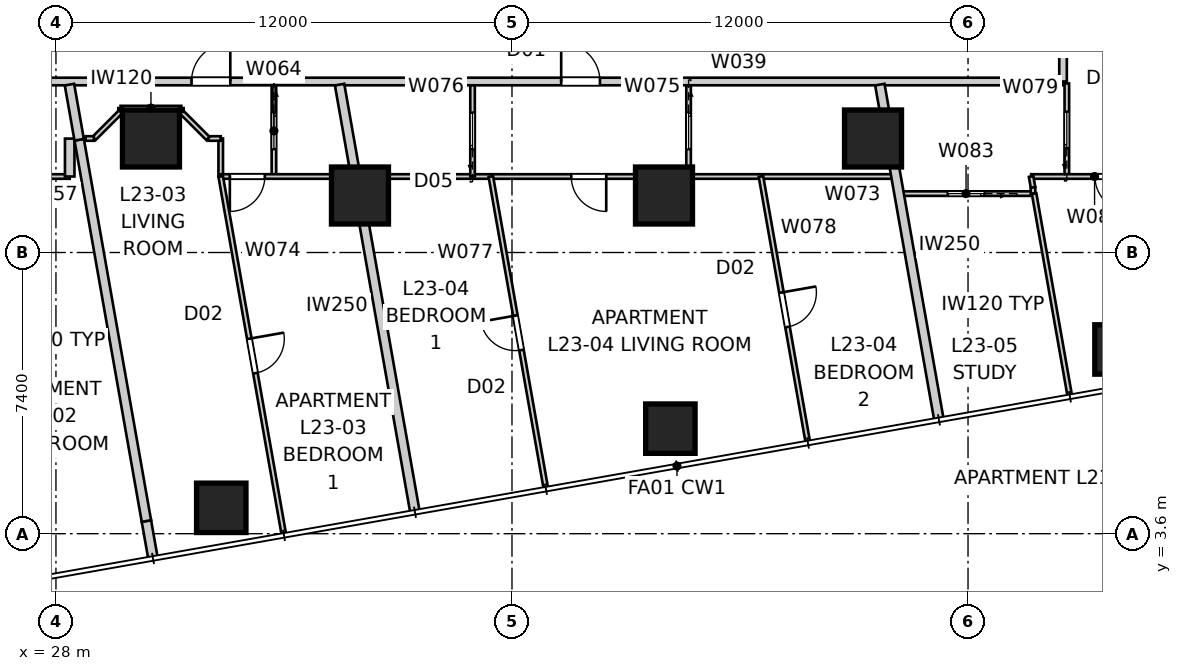
"""IFC4 building model, lengths in metres.
Left out: names, types, materials, properties, quantities, classifications, styles, units other than length and angle.
Written with IfcOpenShell. Run it as: python <this file> out.ifc"""

import sys

from ifc_helpers import new_model, si_unit, direction, frame, frame_2d, origin, origin_2d, place, context, subcontext, project, spatial, rectangle, extrude, element, fill, save


model = new_model("IFC4")
c1 = context("Model", 3, precision=1e-05, world=origin(), true_north=direction((0.0, 1.0)))
c2 = subcontext(c1, "Body", "Model", "MODEL_VIEW")
j1 = project(units=[si_unit("LENGTHUNIT", "METRE"), si_unit("PLANEANGLEUNIT", "RADIAN")], contexts=[c1])
p1 = place(None, origin())
s1 = spatial("IfcSite", under=j1, at=p1, CompositionType="ELEMENT")
p2 = place(p1, origin())
s2 = spatial("IfcBuilding", under=s1, at=p2, CompositionType="ELEMENT")
p3 = place(p2, frame((0.0, 0.0, 86.2)))
s3 = spatial("IfcBuildingStorey", under=s2, at=p3, CompositionType="ELEMENT", Elevation=86.2)
for number, where, z_axis, x_axis in (
    (1, (32.35, 4.281, 0.0), (0.0, 0.0, 1.0), (1.0, 0.0, 0.0)),
    (2, (44.167, 6.365, 0.0), (0.0, 0.0, 1.0), (1.0, 0.0, 0.0)),
    (3, (55.985, 8.448, 0.0), (0.0, 0.0, 1.0), (1.0, 0.0, 0.0)),
):
    element("IfcColumn", number, at=place(p3, frame(where, z_axis=z_axis, x_axis=x_axis)), inside=s3, PredefinedType="COLUMN", context=c2, shape_type="SweptSolid", body=[
        extrude(rectangle(XDim=1.3, YDim=1.3, at=origin_2d()), origin(), (0.0, 0.0, 1.0), 3.4),
    ])
for number, where, z_axis, x_axis in (
    (4, (30.5, 14.0, 0.0), (0.0, 0.0, 1.0), (1.0, 0.0, 0.0)),
    (5, (36.0, 12.5, 0.0), (0.0, 0.0, 1.0), (1.0, 0.0, 0.0)),
    (6, (44.0, 12.5, 0.0), (0.0, 0.0, 1.0), (1.0, 0.0, 0.0)),
    (7, (49.5, 14.0, 0.0), (0.0, 0.0, 1.0), (1.0, 0.0, 0.0)),
):
    element("IfcColumn", number, at=place(p3, frame(where, z_axis=z_axis, x_axis=x_axis)), inside=s3, PredefinedType="COLUMN", context=c2, shape_type="SweptSolid", body=[
        extrude(rectangle(XDim=1.5, YDim=1.5, at=origin_2d()), origin(), (0.0, 0.0, 1.0), 3.4),
    ])
p4 = place(p3, frame((25.5, 15.5, 0.0), z_axis=(0.0, 0.0, 1.0), x_axis=(1.0, 0.0, 0.0)))
e8 = element("IfcWall", 8, at=p4, inside=s3, PredefinedType="PARTITIONING", context=c2, shape_type="SweptSolid", body=[
    extrude(rectangle(XDim=29.0, YDim=0.2, at=frame_2d((14.5, 0.0))), origin(), (0.0, 0.0, 1.0), 3.25),
])
p5 = place(p4, frame((15.794, 0.0, 0.0)))
e9 = element("IfcOpeningElement", 9, at=p5, cuts=e8, PredefinedType="OPENING", context=c2, shape_type="SweptSolid", body=[
    extrude(rectangle(XDim=1.02, YDim=2.34, at=frame_2d((0.51, 1.17))), frame((0.0, 0.11, 0.0), z_axis=(0.0, -1.0, 0.0), x_axis=(1.0, 0.0, 0.0)), (0.0, 0.0, 1.0), 0.22),
])
p6 = place(p4, frame((6.067, 0.0, 0.0)))
e10 = element("IfcOpeningElement", 10, at=p6, cuts=e8, PredefinedType="OPENING", context=c2, shape_type="SweptSolid", body=[
    extrude(rectangle(XDim=1.02, YDim=2.34, at=frame_2d((0.51, 1.17))), frame((0.0, 0.11, 0.0), z_axis=(0.0, -1.0, 0.0), x_axis=(1.0, 0.0, 0.0)), (0.0, 0.0, 1.0), 0.22),
])
p7 = place(p4, frame((1.079, 0.0, 0.0)))
e11 = element("IfcOpeningElement", 11, at=p7, cuts=e8, PredefinedType="OPENING", context=c2, shape_type="SweptSolid", body=[
    extrude(rectangle(XDim=1.02, YDim=2.34, at=frame_2d((0.51, 1.17))), frame((0.0, 0.11, 0.0), z_axis=(0.0, -1.0, 0.0), x_axis=(1.0, 0.0, 0.0)), (0.0, 0.0, 1.0), 0.22),
])
p8 = place(p3, frame((54.5, 15.5, 0.0), z_axis=(0.0, 0.0, 1.0), x_axis=(0.0, 1.0, 0.0)))
e12 = element("IfcWall", 12, at=p8, inside=s3, PredefinedType="PARTITIONING", context=c2, shape_type="SweptSolid", body=[
    extrude(rectangle(XDim=29.0, YDim=0.2, at=frame_2d((14.5, 0.0))), origin(), (0.0, 0.0, 1.0), 3.25),
])
p9 = place(p8, frame((21.815, 0.0, 0.0)))
e13 = element("IfcOpeningElement", 13, at=p9, cuts=e12, PredefinedType="OPENING", context=c2, shape_type="SweptSolid", body=[
    extrude(rectangle(XDim=1.02, YDim=2.34, at=frame_2d((0.51, 1.17))), frame((0.0, 0.11, 0.0), z_axis=(0.0, -1.0, 0.0), x_axis=(1.0, 0.0, 0.0)), (0.0, 0.0, 1.0), 0.22),
])
p10 = place(p8, frame((2.855, 0.0, 0.0)))
e14 = element("IfcOpeningElement", 14, at=p10, cuts=e12, PredefinedType="OPENING", context=c2, shape_type="SweptSolid", body=[
    extrude(rectangle(XDim=1.02, YDim=2.1, at=frame_2d((0.51, 1.05))), frame((0.0, 0.11, 0.0), z_axis=(0.0, -1.0, 0.0), x_axis=(1.0, 0.0, 0.0)), (0.0, 0.0, 1.0), 0.22),
])
p11 = place(p3, frame((37.448, 4.164, 0.0), z_axis=(0.0, 0.0, 1.0), x_axis=(-0.173635416642, 0.98481000304, 0.0)))
e15 = element("IfcWall", 15, at=p11, inside=s3, PredefinedType="PARTITIONING", context=c2, shape_type="SweptSolid", body=[
    extrude(rectangle(XDim=11.427, YDim=0.25, at=frame_2d((5.713, 0.0))), origin(), (0.0, 0.0, 1.0), 3.25),
])
p12 = place(p3, frame((51.235, 6.595, 0.0), z_axis=(0.0, 0.0, 1.0), x_axis=(-0.173654738504, 0.984806596137, 0.0)))
e16 = element("IfcWall", 16, at=p12, inside=s3, PredefinedType="PARTITIONING", context=c2, shape_type="SweptSolid", body=[
    extrude(rectangle(XDim=8.958, YDim=0.25, at=frame_2d((4.479, 0.0))), origin(), (0.0, 0.0, 1.0), 3.25),
])
p13 = place(p3, frame((30.554, 2.949, 0.0), z_axis=(0.0, 0.0, 1.0), x_axis=(-0.173813186416, 0.984778643263, 0.0)))
e17 = element("IfcWall", 17, at=p13, inside=s3, PredefinedType="PARTITIONING", context=c2, shape_type="SweptSolid", body=[
    extrude(rectangle(XDim=1.0, YDim=0.25, at=frame_2d((0.5, 0.0))), origin(), (0.0, 0.0, 1.0), 3.25),
])
p14 = place(p3, frame((30.38, 3.934, 0.0), z_axis=(0.0, 0.0, 1.0), x_axis=(-0.173644522411, 0.984808397525, 0.0)))
e18 = element("IfcWall", 18, at=p14, inside=s3, PredefinedType="PARTITIONING", context=c2, shape_type="SweptSolid", body=[
    extrude(rectangle(XDim=10.188, YDim=0.25, at=frame_2d((5.094, 0.0))), origin(), (0.0, 0.0, 1.0), 2.638),
])
p15 = place(p3, frame((28.611, 13.967, 0.0), z_axis=(0.0, 0.0, 1.0), x_axis=(-0.173634105885, 0.984810234143, 0.0)))
e19 = element("IfcWall", 19, at=p15, inside=s3, PredefinedType="PARTITIONING", context=c2, shape_type="SweptSolid", body=[
    extrude(rectangle(XDim=1.474, YDim=0.25, at=frame_2d((0.737, 0.0))), origin(), (0.0, 0.0, 1.0), 3.25),
])
p16 = place(p3, frame((28.362, 13.0, 0.0), z_axis=(0.0, 0.0, 1.0), x_axis=(-1.0, 0.0, 0.0)))
e20 = element("IfcWall", 20, at=p16, inside=s3, PredefinedType="PARTITIONING", context=c2, shape_type="SweptSolid", body=[
    extrude(rectangle(XDim=4.151, YDim=0.12, at=frame_2d((2.076, 0.0))), origin(), (0.0, 0.0, 1.0), 2.638),
])
p17 = place(p16, frame((1.76, 0.0, 0.0)))
e21 = element("IfcOpeningElement", 21, at=p17, cuts=e20, PredefinedType="OPENING", context=c2, shape_type="SweptSolid", body=[
    extrude(rectangle(XDim=0.92, YDim=2.34, at=frame_2d((0.46, 1.17))), frame((0.0, 0.07, 0.0), z_axis=(0.0, -1.0, 0.0), x_axis=(1.0, 0.0, 0.0)), (0.0, 0.0, 1.0), 0.14),
])
p18 = place(p3, frame((28.362, 13.998, 0.0), z_axis=(0.0, 0.0, 1.0), x_axis=(0.0, -1.0, 0.0)))
e22 = element("IfcWall", 22, at=p18, inside=s3, PredefinedType="PARTITIONING", context=c2, shape_type="SweptSolid", body=[
    extrude(rectangle(XDim=0.998, YDim=0.25, at=frame_2d((0.499, 0.0))), origin(), (0.0, 0.0, 1.0), 3.25),
])
p19 = place(p3, frame((33.736, 15.4, 0.0), z_axis=(0.0, 0.0, 1.0), x_axis=(0.0, -1.0, 0.0)))
e23 = element("IfcWall", 23, at=p19, inside=s3, PredefinedType="PARTITIONING", context=c2, shape_type="SweptSolid", body=[
    extrude(rectangle(XDim=2.4, YDim=0.12, at=frame_2d((1.2, 0.0))), origin(), (0.0, 0.0, 1.0), 3.25),
])
p20 = place(p19, frame((0.72, 0.0, 0.0)))
e24 = element("IfcOpeningElement", 24, at=p20, cuts=e23, PredefinedType="OPENING", context=c2, shape_type="SweptSolid", body=[
    extrude(rectangle(XDim=0.96, YDim=2.1, at=frame_2d((0.48, 1.05))), frame((0.0, 0.07, 0.0), z_axis=(0.0, -1.0, 0.0), x_axis=(1.0, 0.0, 0.0)), (0.0, 0.0, 1.0), 0.14),
])
p21 = place(p3, frame((32.336, 13.0, 0.0), z_axis=(0.0, 0.0, 1.0), x_axis=(0.0, 1.0, 0.0)))
e25 = element("IfcWall", 25, at=p21, inside=s3, PredefinedType="PARTITIONING", context=c2, shape_type="SweptSolid", body=[
    extrude(rectangle(XDim=1.0, YDim=0.12, at=frame_2d((0.5, 0.0))), origin(), (0.0, 0.0, 1.0), 3.25),
])
p22 = place(p3, frame((32.336, 14.0, 0.0), z_axis=(0.0, 0.0, 1.0), x_axis=(-1.0, 0.0, 0.0)))
e26 = element("IfcWall", 26, at=p22, inside=s3, PredefinedType="PARTITIONING", context=c2, shape_type="SweptSolid", body=[
    extrude(rectangle(XDim=0.336, YDim=0.12, at=frame_2d((0.168, 0.0))), origin(), (0.0, 0.0, 1.0), 3.25),
])
p23 = place(p3, frame((32.0, 14.0, 0.0), z_axis=(0.0, 0.0, 1.0), x_axis=(-0.707106781187, 0.707106781187, 0.0)))
e27 = element("IfcWall", 27, at=p23, inside=s3, PredefinedType="PARTITIONING", context=c2, shape_type="SweptSolid", body=[
    extrude(rectangle(XDim=0.99, YDim=0.12, at=frame_2d((0.495, 0.0))), origin(), (0.0, 0.0, 1.0), 3.25),
])
p24 = place(p3, frame((31.3, 14.8, 0.0), z_axis=(0.0, 0.0, 1.0), x_axis=(-1.0, 0.0, 0.0)))
e28 = element("IfcWall", 28, at=p24, inside=s3, PredefinedType="PARTITIONING", context=c2, shape_type="SweptSolid", body=[
    extrude(rectangle(XDim=1.6, YDim=0.12, at=frame_2d((0.8, 0.0))), origin(), (0.0, 0.0, 1.0), 3.25),
])
p25 = place(p3, frame((29.7, 14.7, 0.0), z_axis=(0.0, 0.0, 1.0), x_axis=(-0.707106781187, -0.707106781187, 0.0)))
e29 = element("IfcWall", 29, at=p25, inside=s3, PredefinedType="PARTITIONING", context=c2, shape_type="SweptSolid", body=[
    extrude(rectangle(XDim=0.99, YDim=0.12, at=frame_2d((0.495, 0.0))), origin(), (0.0, 0.0, 1.0), 3.25),
])
p26 = place(p3, frame((29.0, 14.0, 0.0), z_axis=(0.0, 0.0, 1.0), x_axis=(-1.0, 0.0, 0.0)))
e30 = element("IfcWall", 30, at=p26, inside=s3, PredefinedType="PARTITIONING", context=c2, shape_type="SweptSolid", body=[
    extrude(rectangle(XDim=0.219, YDim=0.12, at=frame_2d((0.109, 0.0))), origin(), (0.0, 0.0, 1.0), 3.25),
])
p27 = place(p3, frame((50.105, 13.0, 0.0), z_axis=(0.0, 0.0, 1.0), x_axis=(-1.0, 0.0, 0.0)))
e31 = element("IfcWall", 31, at=p27, inside=s3, PredefinedType="PARTITIONING", context=c2, shape_type="SweptSolid", body=[
    extrude(rectangle(XDim=17.77, YDim=0.12, at=frame_2d((8.885, 0.0))), origin(), (0.0, 0.0, 1.0), 2.55),
])
p28 = place(p27, frame((7.626, 0.0, 0.0)))
e32 = element("IfcOpeningElement", 32, at=p28, cuts=e31, PredefinedType="OPENING", context=c2, shape_type="SweptSolid", body=[
    extrude(rectangle(XDim=0.92, YDim=2.34, at=frame_2d((0.46, 1.17))), frame((0.0, 0.07, 0.0), z_axis=(0.0, -1.0, 0.0), x_axis=(1.0, 0.0, 0.0)), (0.0, 0.0, 1.0), 0.14),
])
p29 = place(p27, frame((16.61, 0.0, 0.0)))
e33 = element("IfcOpeningElement", 33, at=p29, cuts=e31, PredefinedType="OPENING", context=c2, shape_type="SweptSolid", body=[
    extrude(rectangle(XDim=0.92, YDim=2.34, at=frame_2d((0.46, 1.17))), frame((0.0, 0.07, 0.0), z_axis=(0.0, -1.0, 0.0), x_axis=(1.0, 0.0, 0.0)), (0.0, 0.0, 1.0), 0.14),
])
p30 = place(p3, frame((32.336, 13.0, 0.0), z_axis=(0.0, 0.0, 1.0), x_axis=(0.173624894944, -0.984811858101, 0.0)))
e34 = element("IfcWall", 34, at=p30, inside=s3, PredefinedType="PARTITIONING", context=c2, shape_type="SweptSolid", body=[
    extrude(rectangle(XDim=9.549, YDim=0.12, at=frame_2d((4.774, 0.0))), origin(), (0.0, 0.0, 1.0), 3.25),
])
p31 = place(p30, frame((4.334, 0.0, 0.0)))
e35 = element("IfcOpeningElement", 35, at=p31, cuts=e34, PredefinedType="OPENING", context=c2, shape_type="SweptSolid", body=[
    extrude(rectangle(XDim=0.92, YDim=2.34, at=frame_2d((0.46, 1.17))), frame((0.0, 0.07, 0.0), z_axis=(0.0, -1.0, 0.0), x_axis=(1.0, 0.0, 0.0)), (0.0, 0.0, 1.0), 0.14),
])
p32 = place(p3, frame((44.647, 15.4, 0.0), z_axis=(0.0, 0.0, 1.0), x_axis=(0.0, -1.0, 0.0)))
e36 = element("IfcWall", 36, at=p32, inside=s3, PredefinedType="PARTITIONING", context=c2, shape_type="SweptSolid", body=[
    extrude(rectangle(XDim=2.4, YDim=0.12, at=frame_2d((1.2, 0.0))), origin(), (0.0, 0.0, 1.0), 3.25),
])
p33 = place(p32, frame((0.72, 0.0, 0.0)))
e37 = element("IfcOpeningElement", 37, at=p33, cuts=e36, PredefinedType="OPENING", context=c2, shape_type="SweptSolid", body=[
    extrude(rectangle(XDim=0.96, YDim=2.1, at=frame_2d((0.48, 1.05))), frame((0.0, 0.07, 0.0), z_axis=(0.0, -1.0, 0.0), x_axis=(1.0, 0.0, 0.0)), (0.0, 0.0, 1.0), 0.14),
])
p34 = place(p3, frame((38.962, 13.0, 0.0), z_axis=(0.0, 0.0, 1.0), x_axis=(0.0, 1.0, 0.0)))
e38 = element("IfcWall", 38, at=p34, inside=s3, PredefinedType="PARTITIONING", context=c2, shape_type="SweptSolid", body=[
    extrude(rectangle(XDim=2.4, YDim=0.12, at=frame_2d((1.2, 0.0))), origin(), (0.0, 0.0, 1.0), 3.25),
])
p35 = place(p34, frame((0.72, 0.0, 0.0)))
e39 = element("IfcOpeningElement", 39, at=p35, cuts=e38, PredefinedType="OPENING", context=c2, shape_type="SweptSolid", body=[
    extrude(rectangle(XDim=0.96, YDim=2.1, at=frame_2d((0.48, 1.05))), frame((0.0, 0.07, 0.0), z_axis=(0.0, -1.0, 0.0), x_axis=(1.0, 0.0, 0.0)), (0.0, 0.0, 1.0), 0.14),
])
p36 = place(p3, frame((40.887, 4.812, 0.0), z_axis=(0.0, 0.0, 1.0), x_axis=(-0.173647980238, 0.984807787824, 0.0)))
e40 = element("IfcWall", 40, at=p36, inside=s3, PredefinedType="PARTITIONING", context=c2, shape_type="SweptSolid", body=[
    extrude(rectangle(XDim=8.315, YDim=0.12, at=frame_2d((4.157, 0.0))), origin(), (0.0, 0.0, 1.0), 3.25),
])
p37 = place(p36, frame((3.677, 0.0, 0.0)))
e41 = element("IfcOpeningElement", 41, at=p37, cuts=e40, PredefinedType="OPENING", context=c2, shape_type="SweptSolid", body=[
    extrude(rectangle(XDim=0.92, YDim=2.34, at=frame_2d((0.46, 1.17))), frame((0.0, 0.07, 0.0), z_axis=(0.0, -1.0, 0.0), x_axis=(1.0, 0.0, 0.0)), (0.0, 0.0, 1.0), 0.14),
])
p38 = place(p3, frame((46.552, 13.0, 0.0), z_axis=(0.0, 0.0, 1.0), x_axis=(0.173639776761, -0.984809234282, 0.0)))
e42 = element("IfcWall", 42, at=p38, inside=s3, PredefinedType="PARTITIONING", context=c2, shape_type="SweptSolid", body=[
    extrude(rectangle(XDim=7.081, YDim=0.12, at=frame_2d((3.541, 0.0))), origin(), (0.0, 0.0, 1.0), 3.25),
])
p39 = place(p38, frame((3.1, 0.0, 0.0)))
e43 = element("IfcOpeningElement", 43, at=p39, cuts=e42, PredefinedType="OPENING", context=c2, shape_type="SweptSolid", body=[
    extrude(rectangle(XDim=0.92, YDim=2.34, at=frame_2d((0.46, 1.17))), frame((0.0, 0.07, 0.0), z_axis=(0.0, -1.0, 0.0), x_axis=(1.0, 0.0, 0.0)), (0.0, 0.0, 1.0), 0.14),
])
p40 = place(p3, frame((54.6, 13.0, 0.0), z_axis=(0.0, 0.0, 1.0), x_axis=(0.0, 1.0, 0.0)))
e44 = element("IfcWall", 44, at=p40, inside=s3, PredefinedType="PARTITIONING", context=c2, shape_type="SweptSolid", body=[
    extrude(rectangle(XDim=2.45, YDim=0.12, at=frame_2d((1.225, 0.0))), origin(), (0.0, 0.0, 1.0), 3.25),
])
p41 = place(p40, frame((0.745, 0.0, 0.0)))
e45 = element("IfcOpeningElement", 45, at=p41, cuts=e44, PredefinedType="OPENING", context=c2, shape_type="SweptSolid", body=[
    extrude(rectangle(XDim=0.96, YDim=2.1, at=frame_2d((0.48, 1.05))), frame((0.0, 0.07, 0.0), z_axis=(0.0, -1.0, 0.0), x_axis=(1.0, 0.0, 0.0)), (0.0, 0.0, 1.0), 0.14),
])
p42 = place(p3, frame((57.0, 13.0, 0.0), z_axis=(0.0, 0.0, 1.0), x_axis=(-1.0, 0.0, 0.0)))
e46 = element("IfcWall", 46, at=p42, inside=s3, PredefinedType="PARTITIONING", context=c2, shape_type="SweptSolid", body=[
    extrude(rectangle(XDim=3.34, YDim=0.12, at=frame_2d((1.67, 0.0))), origin(), (0.0, 0.0, 1.0), 3.25),
])
p43 = place(p42, frame((0.74, 0.0, 0.0)))
e47 = element("IfcOpeningElement", 47, at=p43, cuts=e46, PredefinedType="OPENING", context=c2, shape_type="SweptSolid", body=[
    extrude(rectangle(XDim=0.92, YDim=2.34, at=frame_2d((0.46, 1.17))), frame((0.0, 0.07, 0.0), z_axis=(0.0, -1.0, 0.0), x_axis=(1.0, 0.0, 0.0)), (0.0, 0.0, 1.0), 0.14),
])
p44 = place(p3, frame((53.71, 12.55, 0.0), z_axis=(0.0, 0.0, 1.0), x_axis=(-1.0, 0.0, 0.0)))
e48 = element("IfcWall", 48, at=p44, inside=s3, PredefinedType="PARTITIONING", context=c2, shape_type="SweptSolid", body=[
    extrude(rectangle(XDim=3.525, YDim=0.12, at=frame_2d((1.763, 0.0))), origin(), (0.0, 0.0, 1.0), 3.25),
])
p45 = place(p44, frame((1.283, 0.0, 0.0)))
e49 = element("IfcOpeningElement", 49, at=p45, cuts=e48, PredefinedType="OPENING", context=c2, shape_type="SweptSolid", body=[
    extrude(rectangle(XDim=0.96, YDim=2.1, at=frame_2d((0.48, 1.05))), frame((0.0, 0.07, 0.0), z_axis=(0.0, -1.0, 0.0), x_axis=(1.0, 0.0, 0.0)), (0.0, 0.0, 1.0), 0.14),
])
p46 = place(p3, frame((53.66, 13.0, 0.0), z_axis=(0.0, 0.0, 1.0), x_axis=(0.172927442902, -0.984934566096, 0.0)))
e50 = element("IfcWall", 50, at=p46, inside=s3, PredefinedType="PARTITIONING", context=c2, shape_type="SweptSolid", body=[
    extrude(rectangle(XDim=0.292, YDim=0.12, at=frame_2d((0.146, 0.0))), origin(), (0.0, 0.0, 1.0), 3.25),
])
p47 = place(p3, frame((53.739, 12.55, 0.0), z_axis=(0.0, 0.0, 1.0), x_axis=(0.173632864151, -0.984810453076, 0.0)))
e51 = element("IfcWall", 51, at=p47, inside=s3, PredefinedType="PARTITIONING", context=c2, shape_type="SweptSolid", body=[
    extrude(rectangle(XDim=5.389, YDim=0.12, at=frame_2d((2.695, 0.0))), origin(), (0.0, 0.0, 1.0), 3.25),
])
for number, where, z_axis, x_axis in (
    (52, (31.3, 14.8, 0.0), (0.0, 0.0, 1.0), (0.0, -1.0, 0.0)),
    (53, (29.7, 14.8, 0.0), (0.0, 0.0, 1.0), (0.0, -1.0, 0.0)),
):
    element("IfcWall", number, at=place(p3, frame(where, z_axis=z_axis, x_axis=x_axis)), inside=s3, PredefinedType="PARTITIONING", context=c2, shape_type="SweptSolid", body=[
        extrude(rectangle(XDim=0.1, YDim=0.12, at=frame_2d((0.05, 0.0))), origin(), (0.0, 0.0, 1.0), 3.25),
    ])
p48 = place(p3, frame((53.71, 12.712, 0.0), z_axis=(0.0, 0.0, 1.0), x_axis=(0.0, -1.0, 0.0)))
e54 = element("IfcWall", 54, at=p48, inside=s3, PredefinedType="PARTITIONING", context=c2, shape_type="SweptSolid", body=[
    extrude(rectangle(XDim=0.162, YDim=0.12, at=frame_2d((0.081, 0.0))), origin(), (0.0, 0.0, 1.0), 3.25),
])
p49 = place(p5, origin())
e55 = element("IfcDoor", 55, at=p49, inside=s3, OperationType="SINGLE_SWING_LEFT", PredefinedType="DOOR", context=c2, shape_type="SweptSolid", body=[
    extrude(rectangle(XDim=1.02, YDim=2.34, at=frame_2d((0.51, 1.17))), frame((0.0, 0.025, 0.0), z_axis=(0.0, -1.0, 0.0), x_axis=(1.0, 0.0, 0.0)), (0.0, 0.0, 1.0), 0.05),
])
fill(e9, e55)
p50 = place(p6, origin())
e56 = element("IfcDoor", 56, at=p50, inside=s3, OperationType="SINGLE_SWING_RIGHT", PredefinedType="DOOR", context=c2, shape_type="SweptSolid", body=[
    extrude(rectangle(XDim=1.02, YDim=2.34, at=frame_2d((0.51, 1.17))), frame((0.0, 0.025, 0.0), z_axis=(0.0, -1.0, 0.0), x_axis=(1.0, 0.0, 0.0)), (0.0, 0.0, 1.0), 0.05),
])
fill(e10, e56)
p51 = place(p41, origin())
e57 = element("IfcDoor", 57, at=p51, inside=s3, OperationType="SLIDING_TO_LEFT", PredefinedType="DOOR", context=c2, shape_type="SweptSolid", body=[
    extrude(rectangle(XDim=0.96, YDim=2.1, at=frame_2d((0.48, 1.05))), frame((0.0, 0.025, 0.0), z_axis=(0.0, -1.0, 0.0), x_axis=(1.0, 0.0, 0.0)), (0.0, 0.0, 1.0), 0.05),
])
fill(e45, e57)
p52 = place(p43, origin())
e58 = element("IfcDoor", 58, at=p52, inside=s3, OperationType="SINGLE_SWING_LEFT", PredefinedType="DOOR", context=c2, shape_type="SweptSolid", body=[
    extrude(rectangle(XDim=0.92, YDim=2.34, at=frame_2d((0.46, 1.17))), frame((0.0, 0.025, 0.0), z_axis=(0.0, -1.0, 0.0), x_axis=(1.0, 0.0, 0.0)), (0.0, 0.0, 1.0), 0.05),
])
fill(e47, e58)
p53 = place(p28, origin())
e59 = element("IfcDoor", 59, at=p53, inside=s3, OperationType="SINGLE_SWING_LEFT", PredefinedType="DOOR", context=c2, shape_type="SweptSolid", body=[
    extrude(rectangle(XDim=0.92, YDim=2.34, at=frame_2d((0.46, 1.17))), frame((0.0, 0.025, 0.0), z_axis=(0.0, -1.0, 0.0), x_axis=(1.0, 0.0, 0.0)), (0.0, 0.0, 1.0), 0.05),
])
fill(e32, e59)
p54 = place(p33, origin())
e60 = element("IfcDoor", 60, at=p54, inside=s3, OperationType="SLIDING_TO_LEFT", PredefinedType="DOOR", context=c2, shape_type="SweptSolid", body=[
    extrude(rectangle(XDim=0.96, YDim=2.1, at=frame_2d((0.48, 1.05))), frame((0.0, 0.025, 0.0), z_axis=(0.0, -1.0, 0.0), x_axis=(1.0, 0.0, 0.0)), (0.0, 0.0, 1.0), 0.05),
])
fill(e37, e60)
p55 = place(p35, origin())
e61 = element("IfcDoor", 61, at=p55, inside=s3, OperationType="SLIDING_TO_LEFT", PredefinedType="DOOR", context=c2, shape_type="SweptSolid", body=[
    extrude(rectangle(XDim=0.96, YDim=2.1, at=frame_2d((0.48, 1.05))), frame((0.0, 0.025, 0.0), z_axis=(0.0, -1.0, 0.0), x_axis=(1.0, 0.0, 0.0)), (0.0, 0.0, 1.0), 0.05),
])
fill(e39, e61)
p56 = place(p20, origin())
e62 = element("IfcDoor", 62, at=p56, inside=s3, OperationType="SLIDING_TO_LEFT", PredefinedType="DOOR", context=c2, shape_type="SweptSolid", body=[
    extrude(rectangle(XDim=0.96, YDim=2.1, at=frame_2d((0.48, 1.05))), frame((0.0, 0.025, 0.0), z_axis=(0.0, -1.0, 0.0), x_axis=(1.0, 0.0, 0.0)), (0.0, 0.0, 1.0), 0.05),
])
fill(e24, e62)
p57 = place(p29, origin())
e63 = element("IfcDoor", 63, at=p57, inside=s3, OperationType="SINGLE_SWING_RIGHT", PredefinedType="DOOR", context=c2, shape_type="SweptSolid", body=[
    extrude(rectangle(XDim=0.92, YDim=2.34, at=frame_2d((0.46, 1.17))), frame((0.0, 0.025, 0.0), z_axis=(0.0, -1.0, 0.0), x_axis=(1.0, 0.0, 0.0)), (0.0, 0.0, 1.0), 0.05),
])
fill(e33, e63)
p58 = place(p45, origin())
e64 = element("IfcDoor", 64, at=p58, inside=s3, OperationType="SLIDING_TO_LEFT", PredefinedType="DOOR", context=c2, shape_type="SweptSolid", body=[
    extrude(rectangle(XDim=0.96, YDim=2.1, at=frame_2d((0.48, 1.05))), frame((0.0, 0.025, 0.0), z_axis=(0.0, -1.0, 0.0), x_axis=(1.0, 0.0, 0.0)), (0.0, 0.0, 1.0), 0.05),
])
fill(e49, e64)
p59 = place(p37, origin())
e65 = element("IfcDoor", 65, at=p59, inside=s3, OperationType="SINGLE_SWING_RIGHT", PredefinedType="DOOR", context=c2, shape_type="SweptSolid", body=[
    extrude(rectangle(XDim=0.92, YDim=2.34, at=frame_2d((0.46, 1.17))), frame((0.0, 0.025, 0.0), z_axis=(0.0, -1.0, 0.0), x_axis=(1.0, 0.0, 0.0)), (0.0, 0.0, 1.0), 0.05),
])
fill(e41, e65)
p60 = place(p39, origin())
e66 = element("IfcDoor", 66, at=p60, inside=s3, OperationType="SINGLE_SWING_LEFT", PredefinedType="DOOR", context=c2, shape_type="SweptSolid", body=[
    extrude(rectangle(XDim=0.92, YDim=2.34, at=frame_2d((0.46, 1.17))), frame((0.0, 0.025, 0.0), z_axis=(0.0, -1.0, 0.0), x_axis=(1.0, 0.0, 0.0)), (0.0, 0.0, 1.0), 0.05),
])
fill(e43, e66)
p61 = place(p31, origin())
e67 = element("IfcDoor", 67, at=p61, inside=s3, OperationType="SINGLE_SWING_LEFT", PredefinedType="DOOR", context=c2, shape_type="SweptSolid", body=[
    extrude(rectangle(XDim=0.92, YDim=2.34, at=frame_2d((0.46, 1.17))), frame((0.0, 0.025, 0.0), z_axis=(0.0, -1.0, 0.0), x_axis=(1.0, 0.0, 0.0)), (0.0, 0.0, 1.0), 0.05),
])
fill(e35, e67)
save(model, sys.argv[1])
